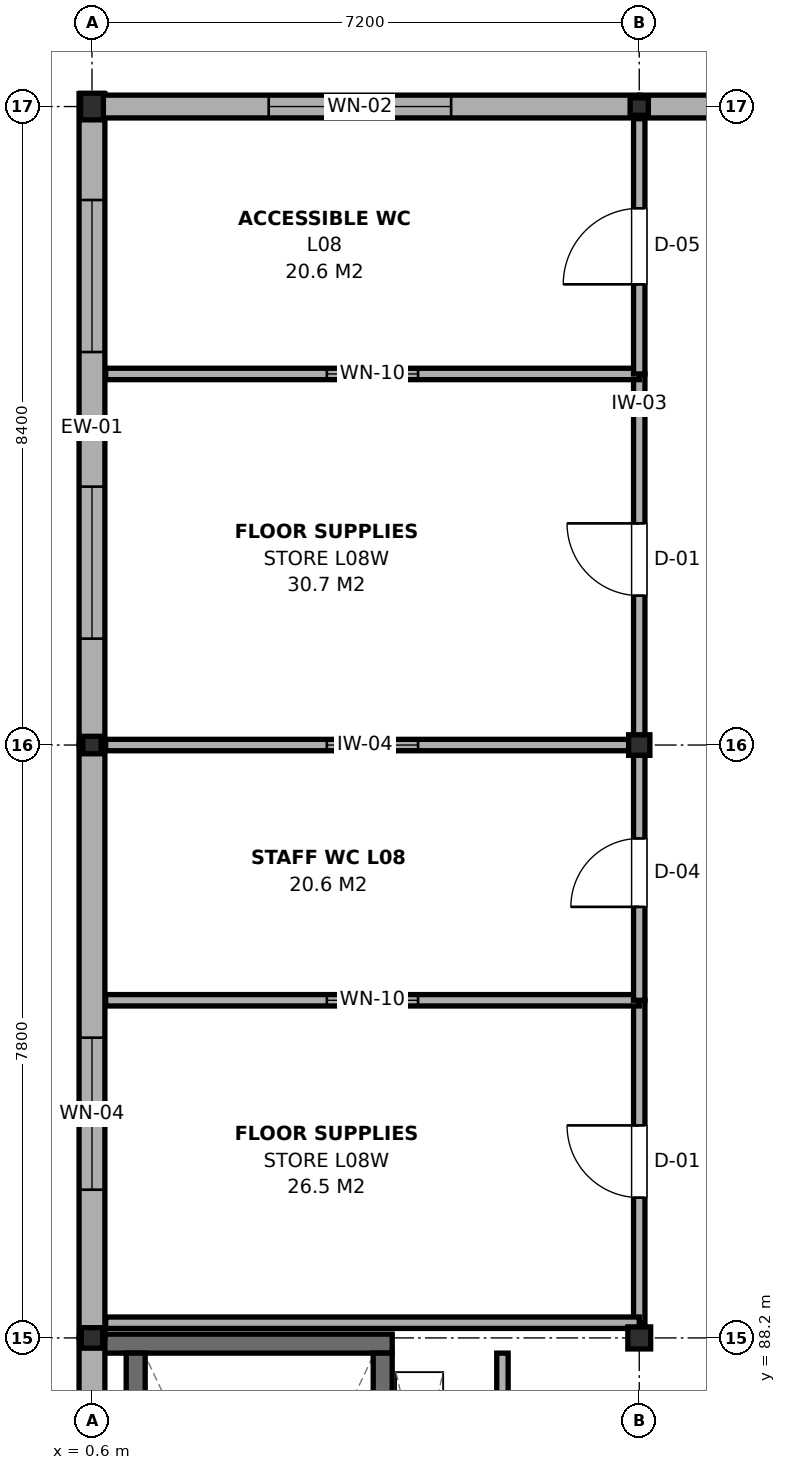
"""IFC4 building model, lengths in metres.
Left out: names, types, materials, properties, quantities, classifications, styles, units other than length and angle.
Written with IfcOpenShell. Run it as: python <this file> out.ifc"""

import sys

from ifc_helpers import new_model, si_unit, direction, frame, frame_2d, origin, origin_2d, place, context, subcontext, project, spatial, rectangle, i_section, extrude, element, fill, save


model = new_model("IFC4")
c1 = context("Model", 3, precision=1e-05, world=origin(), true_north=direction((0.0, 1.0)))
c2 = subcontext(c1, "Body", "Model", "MODEL_VIEW")
j1 = project(units=[si_unit("LENGTHUNIT", "METRE"), si_unit("PLANEANGLEUNIT", "RADIAN")], contexts=[c1])
p1 = place(None, origin())
s1 = spatial("IfcSite", under=j1, at=p1, CompositionType="ELEMENT")
p2 = place(p1, origin())
s2 = spatial("IfcBuilding", under=s1, at=p2, CompositionType="ELEMENT")
p3 = place(p2, frame((0.0, 0.0, 32.7)))
s3 = spatial("IfcBuildingStorey", under=s2, at=p3, CompositionType="ELEMENT", Elevation=32.7)
p4 = place(p3, frame((0.6, 88.2, 0.0), z_axis=(0.0, 0.0, 1.0), x_axis=(1.0, 0.0, 0.0)))
e1 = element("IfcColumn", 1, at=p4, inside=s3, PredefinedType="COLUMN", context=c2, shape_type="SweptSolid", body=[
    extrude(i_section(OverallWidth=0.28, OverallDepth=0.27, WebThickness=0.008, FlangeThickness=0.013, FilletRadius=0.024, at=origin_2d()), origin(), (0.0, 0.0, 1.0), 3.72),
])
p5 = place(p3, frame((0.6, 96.0, 0.0), z_axis=(0.0, 0.0, 1.0), x_axis=(1.0, 0.0, 0.0)))
e2 = element("IfcColumn", 2, at=p5, inside=s3, PredefinedType="COLUMN", context=c2, shape_type="SweptSolid", body=[
    extrude(i_section(OverallWidth=0.24, OverallDepth=0.23, WebThickness=0.008, FlangeThickness=0.012, FilletRadius=0.021, at=origin_2d()), origin(), (0.0, 0.0, 1.0), 3.72),
])
p6 = place(p3, frame((0.6, 104.4, 0.0), z_axis=(0.0, 0.0, 1.0), x_axis=(1.0, 0.0, 0.0)))
e3 = element("IfcColumn", 3, at=p6, inside=s3, PredefinedType="COLUMN", context=c2, shape_type="SweptSolid", body=[
    extrude(i_section(OverallWidth=0.3, OverallDepth=0.35, WebThickness=0.01, FlangeThickness=0.018, FilletRadius=0.027, at=origin_2d()), origin(), (0.0, 0.0, 1.0), 3.72),
])
p7 = place(p3, frame((7.8, 88.2, 0.0), z_axis=(0.0, 0.0, 1.0), x_axis=(1.0, 0.0, 0.0)))
e4 = element("IfcColumn", 4, at=p7, inside=s3, PredefinedType="COLUMN", context=c2, shape_type="SweptSolid", body=[
    extrude(i_section(OverallWidth=0.3, OverallDepth=0.29, WebThickness=0.009, FlangeThickness=0.014, FilletRadius=0.027, at=origin_2d()), origin(), (0.0, 0.0, 1.0), 3.72),
])
p8 = place(p3, frame((7.8, 96.0, 0.0), z_axis=(0.0, 0.0, 1.0), x_axis=(1.0, 0.0, 0.0)))
e5 = element("IfcColumn", 5, at=p8, inside=s3, PredefinedType="COLUMN", context=c2, shape_type="SweptSolid", body=[
    extrude(i_section(OverallWidth=0.28, OverallDepth=0.27, WebThickness=0.008, FlangeThickness=0.013, FilletRadius=0.024, at=origin_2d()), origin(), (0.0, 0.0, 1.0), 3.72),
])
p9 = place(p3, frame((7.8, 104.4, 0.0), z_axis=(0.0, 0.0, 1.0), x_axis=(1.0, 0.0, 0.0)))
e6 = element("IfcColumn", 6, at=p9, inside=s3, PredefinedType="COLUMN", context=c2, shape_type="SweptSolid", body=[
    extrude(i_section(OverallWidth=0.24, OverallDepth=0.23, WebThickness=0.008, FlangeThickness=0.012, FilletRadius=0.021, at=origin_2d()), origin(), (0.0, 0.0, 1.0), 3.72),
])
p10 = place(p3, frame((0.75, 88.125, 0.0), z_axis=(0.0, 0.0, 1.0), x_axis=(1.0, 0.0, 0.0)))
e7 = element("IfcWall", 7, at=p10, inside=s3, PredefinedType="SHEAR", context=c2, shape_type="SweptSolid", body=[
    extrude(rectangle(XDim=3.8, YDim=0.25, at=frame_2d((1.9, 0.0))), origin(), (0.0, 0.0, 1.0), 3.9),
])
p11 = place(p3, frame((1.175, 81.6, 0.0), z_axis=(0.0, 0.0, 1.0), x_axis=(0.0, 1.0, 0.0)))
e8 = element("IfcWall", 8, at=p11, inside=s3, PredefinedType="SHEAR", context=c2, shape_type="SweptSolid", body=[
    extrude(rectangle(XDim=6.4, YDim=0.25, at=frame_2d((3.2, 0.0))), origin(), (0.0, 0.0, 1.0), 3.9),
])
p12 = place(p3, frame((4.425, 81.6, 0.0), z_axis=(0.0, 0.0, 1.0), x_axis=(0.0, 1.0, 0.0)))
e9 = element("IfcWall", 9, at=p12, inside=s3, PredefinedType="SHEAR", context=c2, shape_type="SweptSolid", body=[
    extrude(rectangle(XDim=6.4, YDim=0.25, at=frame_2d((3.2, 0.0))), origin(), (0.0, 0.0, 1.0), 3.9),
])
p13 = place(p12, frame((0.17, 0.0, 0.0)))
e10 = element("IfcOpeningElement", 10, at=p13, cuts=e9, PredefinedType="OPENING", context=c2, shape_type="SweptSolid", body=[
    extrude(rectangle(XDim=1.1, YDim=2.15, at=frame_2d((0.55, 1.075))), frame((0.0, 0.14, 0.0), z_axis=(0.0, -1.0, 0.0), x_axis=(1.0, 0.0, 0.0)), (0.0, 0.0, 1.0), 0.28),
])
p14 = place(p3, frame((0.6, 81.0, 0.0), z_axis=(0.0, 0.0, 1.0), x_axis=(0.0, 1.0, 0.0)))
e11 = element("IfcWall", 11, at=p14, inside=s3, PredefinedType="SOLIDWALL", context=c2, shape_type="SweptSolid", body=[
    extrude(rectangle(XDim=7.2, YDim=0.34, at=frame_2d((3.6, 0.0))), origin(), (0.0, 0.0, 1.0), 3.165),
])
p15 = place(p3, frame((0.6, 88.2, 0.0), z_axis=(0.0, 0.0, 1.0), x_axis=(0.0, 1.0, 0.0)))
e12 = element("IfcWall", 12, at=p15, inside=s3, PredefinedType="SOLIDWALL", context=c2, shape_type="SweptSolid", body=[
    extrude(rectangle(XDim=7.8, YDim=0.34, at=frame_2d((3.9, 0.0))), origin(), (0.0, 0.0, 1.0), 3.125),
])
p16 = place(p15, frame((1.95, 0.0, 0.9)))
e13 = element("IfcOpeningElement", 13, at=p16, cuts=e12, PredefinedType="OPENING", context=c2, shape_type="SweptSolid", body=[
    extrude(rectangle(XDim=2.0, YDim=1.8, at=frame_2d((1.0, 0.9))), frame((0.0, 0.185, 0.0), z_axis=(0.0, -1.0, 0.0), x_axis=(1.0, 0.0, 0.0)), (0.0, 0.0, 1.0), 0.37),
])
p17 = place(p3, frame((0.6, 96.0, 0.0), z_axis=(0.0, 0.0, 1.0), x_axis=(0.0, 1.0, 0.0)))
e14 = element("IfcWall", 14, at=p17, inside=s3, PredefinedType="SOLIDWALL", context=c2, shape_type="SweptSolid", body=[
    extrude(rectangle(XDim=8.57, YDim=0.34, at=frame_2d((4.285, 0.0))), origin(), (0.0, 0.0, 1.0), 3.125),
])
p18 = place(p17, frame((1.4, 0.0, 0.9)))
e15 = element("IfcOpeningElement", 15, at=p18, cuts=e14, PredefinedType="OPENING", context=c2, shape_type="SweptSolid", body=[
    extrude(rectangle(XDim=2.0, YDim=1.8, at=frame_2d((1.0, 0.9))), frame((0.0, 0.185, 0.0), z_axis=(0.0, -1.0, 0.0), x_axis=(1.0, 0.0, 0.0)), (0.0, 0.0, 1.0), 0.37),
])
p19 = place(p17, frame((5.17, 0.0, 0.9)))
e16 = element("IfcOpeningElement", 16, at=p19, cuts=e14, PredefinedType="OPENING", context=c2, shape_type="SweptSolid", body=[
    extrude(rectangle(XDim=2.0, YDim=1.8, at=frame_2d((1.0, 0.9))), frame((0.0, 0.185, 0.0), z_axis=(0.0, -1.0, 0.0), x_axis=(1.0, 0.0, 0.0)), (0.0, 0.0, 1.0), 0.37),
])
p20 = place(p3, frame((0.45, 104.4, 0.0), z_axis=(0.0, 0.0, 1.0), x_axis=(1.0, 0.0, 0.0)))
e17 = element("IfcWall", 17, at=p20, inside=s3, PredefinedType="SOLIDWALL", context=c2, shape_type="SweptSolid", body=[
    extrude(rectangle(XDim=7.35, YDim=0.3, at=frame_2d((3.675, 0.0))), origin(), (0.0, 0.0, 1.0), 3.215),
])
p21 = place(p20, frame((2.475, 0.0, 0.9)))
e18 = element("IfcOpeningElement", 18, at=p21, cuts=e17, PredefinedType="OPENING", context=c2, shape_type="SweptSolid", body=[
    extrude(rectangle(XDim=2.4, YDim=2.1, at=frame_2d((1.2, 1.05))), frame((0.0, 0.165, 0.0), z_axis=(0.0, -1.0, 0.0), x_axis=(1.0, 0.0, 0.0)), (0.0, 0.0, 1.0), 0.33),
])
p22 = place(p3, frame((7.8, 104.4, 0.0), z_axis=(0.0, 0.0, 1.0), x_axis=(1.0, 0.0, 0.0)))
e19 = element("IfcWall", 19, at=p22, inside=s3, PredefinedType="SOLIDWALL", context=c2, shape_type="SweptSolid", body=[
    extrude(rectangle(XDim=7.35, YDim=0.3, at=frame_2d((3.675, 0.0))), origin(), (0.0, 0.0, 1.0), 3.215),
])
p23 = place(p22, frame((3.425, 0.0, 0.9)))
e20 = element("IfcOpeningElement", 20, at=p23, cuts=e19, PredefinedType="OPENING", context=c2, shape_type="SweptSolid", body=[
    extrude(rectangle(XDim=2.4, YDim=2.1, at=frame_2d((1.2, 1.05))), frame((0.0, 0.165, 0.0), z_axis=(0.0, -1.0, 0.0), x_axis=(1.0, 0.0, 0.0)), (0.0, 0.0, 1.0), 0.33),
])
p24 = place(p3, frame((6.0, 84.8, 0.0), z_axis=(0.0, 0.0, 1.0), x_axis=(0.0, 1.0, 0.0)))
e21 = element("IfcWall", 21, at=p24, inside=s3, PredefinedType="PARTITIONING", context=c2, shape_type="SweptSolid", body=[
    extrude(rectangle(XDim=3.2, YDim=0.15, at=frame_2d((1.6, 0.0))), origin(), (0.0, 0.0, 1.0), 3.365),
])
p25 = place(p24, frame((1.175, 0.0, 0.0)))
e22 = element("IfcOpeningElement", 22, at=p25, cuts=e21, PredefinedType="OPENING", context=c2, shape_type="SweptSolid", body=[
    extrude(rectangle(XDim=0.85, YDim=2.1, at=frame_2d((0.425, 1.05))), frame((0.0, 0.09, 0.0), z_axis=(0.0, -1.0, 0.0), x_axis=(1.0, 0.0, 0.0)), (0.0, 0.0, 1.0), 0.18),
])
p26 = place(p3, frame((7.8, 88.4, 0.0), z_axis=(0.0, 0.0, 1.0), x_axis=(0.0, 1.0, 0.0)))
e23 = element("IfcWall", 23, at=p26, inside=s3, PredefinedType="PARTITIONING", context=c2, shape_type="SweptSolid", body=[
    extrude(rectangle(XDim=4.242, YDim=0.15, at=frame_2d((2.121, 0.0))), origin(), (0.0, 0.0, 1.0), 3.365),
])
p27 = place(p26, frame((1.646, 0.0, 0.0)))
e24 = element("IfcOpeningElement", 24, at=p27, cuts=e23, PredefinedType="OPENING", context=c2, shape_type="SweptSolid", body=[
    extrude(rectangle(XDim=0.95, YDim=2.15, at=frame_2d((0.475, 1.075))), frame((0.0, 0.09, 0.0), z_axis=(0.0, -1.0, 0.0), x_axis=(1.0, 0.0, 0.0)), (0.0, 0.0, 1.0), 0.18),
])
p28 = place(p3, frame((0.78, 92.642, 0.0), z_axis=(0.0, 0.0, 1.0), x_axis=(1.0, 0.0, 0.0)))
e25 = element("IfcWall", 25, at=p28, inside=s3, PredefinedType="PARTITIONING", context=c2, shape_type="SweptSolid", body=[
    extrude(rectangle(XDim=7.02, YDim=0.15, at=frame_2d((3.51, 0.0))), origin(), (0.0, 0.0, 1.0), 3.265),
])
p29 = place(p28, frame((2.91, 0.0, 0.95)))
e26 = element("IfcOpeningElement", 26, at=p29, cuts=e25, PredefinedType="OPENING", context=c2, shape_type="SweptSolid", body=[
    extrude(rectangle(XDim=1.2, YDim=1.5, at=frame_2d((0.6, 0.75))), frame((0.0, 0.09, 0.0), z_axis=(0.0, -1.0, 0.0), x_axis=(1.0, 0.0, 0.0)), (0.0, 0.0, 1.0), 0.18),
])
p30 = place(p3, frame((7.8, 92.642, 0.0), z_axis=(0.0, 0.0, 1.0), x_axis=(0.0, 1.0, 0.0)))
e27 = element("IfcWall", 27, at=p30, inside=s3, PredefinedType="PARTITIONING", context=c2, shape_type="SweptSolid", body=[
    extrude(rectangle(XDim=3.358, YDim=0.15, at=frame_2d((1.679, 0.0))), origin(), (0.0, 0.0, 1.0), 3.115),
])
p31 = place(p30, frame((1.229, 0.0, 0.0)))
e28 = element("IfcOpeningElement", 28, at=p31, cuts=e27, PredefinedType="OPENING", context=c2, shape_type="SweptSolid", body=[
    extrude(rectangle(XDim=0.9, YDim=2.15, at=frame_2d((0.45, 1.075))), frame((0.0, 0.09, 0.0), z_axis=(0.0, -1.0, 0.0), x_axis=(1.0, 0.0, 0.0)), (0.0, 0.0, 1.0), 0.18),
])
p32 = place(p3, frame((0.78, 88.4, 0.0), z_axis=(0.0, 0.0, 1.0), x_axis=(1.0, 0.0, 0.0)))
e29 = element("IfcWall", 29, at=p32, inside=s3, PredefinedType="PARTITIONING", context=c2, shape_type="SweptSolid", body=[
    extrude(rectangle(XDim=7.02, YDim=0.15, at=frame_2d((3.51, 0.0))), origin(), (0.0, 0.0, 1.0), 3.265),
])
p33 = place(p3, frame((7.8, 96.0, 0.0), z_axis=(0.0, 0.0, 1.0), x_axis=(0.0, 1.0, 0.0)))
e30 = element("IfcWall", 30, at=p33, inside=s3, PredefinedType="PARTITIONING", context=c2, shape_type="SweptSolid", body=[
    extrude(rectangle(XDim=4.882, YDim=0.15, at=frame_2d((2.441, 0.0))), origin(), (0.0, 0.0, 1.0), 3.115),
])
p34 = place(p33, frame((1.966, 0.0, 0.0)))
e31 = element("IfcOpeningElement", 31, at=p34, cuts=e30, PredefinedType="OPENING", context=c2, shape_type="SweptSolid", body=[
    extrude(rectangle(XDim=0.95, YDim=2.15, at=frame_2d((0.475, 1.075))), frame((0.0, 0.09, 0.0), z_axis=(0.0, -1.0, 0.0), x_axis=(1.0, 0.0, 0.0)), (0.0, 0.0, 1.0), 0.18),
])
p35 = place(p3, frame((0.78, 100.882, 0.0), z_axis=(0.0, 0.0, 1.0), x_axis=(1.0, 0.0, 0.0)))
e32 = element("IfcWall", 32, at=p35, inside=s3, PredefinedType="PARTITIONING", context=c2, shape_type="SweptSolid", body=[
    extrude(rectangle(XDim=7.02, YDim=0.15, at=frame_2d((3.51, 0.0))), origin(), (0.0, 0.0, 1.0), 3.125),
])
p36 = place(p35, frame((2.91, 0.0, 0.95)))
e33 = element("IfcOpeningElement", 33, at=p36, cuts=e32, PredefinedType="OPENING", context=c2, shape_type="SweptSolid", body=[
    extrude(rectangle(XDim=1.2, YDim=1.5, at=frame_2d((0.6, 0.75))), frame((0.0, 0.09, 0.0), z_axis=(0.0, -1.0, 0.0), x_axis=(1.0, 0.0, 0.0)), (0.0, 0.0, 1.0), 0.18),
])
p37 = place(p3, frame((7.8, 100.882, 0.0), z_axis=(0.0, 0.0, 1.0), x_axis=(0.0, 1.0, 0.0)))
e34 = element("IfcWall", 34, at=p37, inside=s3, PredefinedType="PARTITIONING", context=c2, shape_type="SweptSolid", body=[
    extrude(rectangle(XDim=3.358, YDim=0.15, at=frame_2d((1.679, 0.0))), origin(), (0.0, 0.0, 1.0), 3.175),
])
p38 = place(p37, frame((1.179, 0.0, 0.0)))
e35 = element("IfcOpeningElement", 35, at=p38, cuts=e34, PredefinedType="OPENING", context=c2, shape_type="SweptSolid", body=[
    extrude(rectangle(XDim=1.0, YDim=2.15, at=frame_2d((0.5, 1.075))), frame((0.0, 0.09, 0.0), z_axis=(0.0, -1.0, 0.0), x_axis=(1.0, 0.0, 0.0)), (0.0, 0.0, 1.0), 0.18),
])
p39 = place(p3, frame((0.78, 96.0, 0.0), z_axis=(0.0, 0.0, 1.0), x_axis=(1.0, 0.0, 0.0)))
e36 = element("IfcWall", 36, at=p39, inside=s3, PredefinedType="PARTITIONING", context=c2, shape_type="SweptSolid", body=[
    extrude(rectangle(XDim=7.02, YDim=0.15, at=frame_2d((3.51, 0.0))), origin(), (0.0, 0.0, 1.0), 3.115),
])
p40 = place(p39, frame((2.91, 0.0, 0.95)))
e37 = element("IfcOpeningElement", 37, at=p40, cuts=e36, PredefinedType="OPENING", context=c2, shape_type="SweptSolid", body=[
    extrude(rectangle(XDim=1.2, YDim=1.5, at=frame_2d((0.6, 0.75))), frame((0.0, 0.09, 0.0), z_axis=(0.0, -1.0, 0.0), x_axis=(1.0, 0.0, 0.0)), (0.0, 0.0, 1.0), 0.18),
])
p41 = place(p16, origin())
e38 = element("IfcWindow", 38, at=p41, inside=s3, PartitioningType="SINGLE_PANEL", PredefinedType="WINDOW", context=c2, shape_type="SweptSolid", body=[
    extrude(rectangle(XDim=2.0, YDim=1.8, at=frame_2d((1.0, 0.9))), frame((0.0, 0.03, 0.0), z_axis=(0.0, -1.0, 0.0), x_axis=(1.0, 0.0, 0.0)), (0.0, 0.0, 1.0), 0.06),
])
fill(e13, e38)
p42 = place(p18, origin())
e39 = element("IfcWindow", 39, at=p42, inside=s3, PartitioningType="SINGLE_PANEL", PredefinedType="WINDOW", context=c2, shape_type="SweptSolid", body=[
    extrude(rectangle(XDim=2.0, YDim=1.8, at=frame_2d((1.0, 0.9))), frame((0.0, 0.03, 0.0), z_axis=(0.0, -1.0, 0.0), x_axis=(1.0, 0.0, 0.0)), (0.0, 0.0, 1.0), 0.06),
])
fill(e15, e39)
p43 = place(p19, origin())
e40 = element("IfcWindow", 40, at=p43, inside=s3, PartitioningType="SINGLE_PANEL", PredefinedType="WINDOW", context=c2, shape_type="SweptSolid", body=[
    extrude(rectangle(XDim=2.0, YDim=1.8, at=frame_2d((1.0, 0.9))), frame((0.0, 0.03, 0.0), z_axis=(0.0, -1.0, 0.0), x_axis=(1.0, 0.0, 0.0)), (0.0, 0.0, 1.0), 0.06),
])
fill(e16, e40)
p44 = place(p21, origin())
e41 = element("IfcWindow", 41, at=p44, inside=s3, PartitioningType="SINGLE_PANEL", PredefinedType="WINDOW", context=c2, shape_type="SweptSolid", body=[
    extrude(rectangle(XDim=2.4, YDim=2.1, at=frame_2d((1.2, 1.05))), frame((0.0, 0.03, 0.0), z_axis=(0.0, -1.0, 0.0), x_axis=(1.0, 0.0, 0.0)), (0.0, 0.0, 1.0), 0.06),
])
fill(e18, e41)
p45 = place(p27, origin())
e42 = element("IfcDoor", 42, at=p45, inside=s3, OperationType="SINGLE_SWING_RIGHT", PredefinedType="DOOR", context=c2, shape_type="SweptSolid", body=[
    extrude(rectangle(XDim=0.95, YDim=2.15, at=frame_2d((0.475, 1.075))), frame((0.0, 0.025, 0.0), z_axis=(0.0, -1.0, 0.0), x_axis=(1.0, 0.0, 0.0)), (0.0, 0.0, 1.0), 0.05),
])
fill(e24, e42)
p46 = place(p29, origin())
e43 = element("IfcWindow", 43, at=p46, inside=s3, PartitioningType="SINGLE_PANEL", PredefinedType="WINDOW", context=c2, shape_type="SweptSolid", body=[
    extrude(rectangle(XDim=1.2, YDim=1.5, at=frame_2d((0.6, 0.75))), frame((0.0, 0.03, 0.0), z_axis=(0.0, -1.0, 0.0), x_axis=(1.0, 0.0, 0.0)), (0.0, 0.0, 1.0), 0.06),
])
fill(e26, e43)
p47 = place(p31, origin())
e44 = element("IfcDoor", 44, at=p47, inside=s3, OperationType="SINGLE_SWING_LEFT", PredefinedType="DOOR", context=c2, shape_type="SweptSolid", body=[
    extrude(rectangle(XDim=0.9, YDim=2.15, at=frame_2d((0.45, 1.075))), frame((0.0, 0.025, 0.0), z_axis=(0.0, -1.0, 0.0), x_axis=(1.0, 0.0, 0.0)), (0.0, 0.0, 1.0), 0.05),
])
fill(e28, e44)
p48 = place(p34, origin())
e45 = element("IfcDoor", 45, at=p48, inside=s3, OperationType="SINGLE_SWING_RIGHT", PredefinedType="DOOR", context=c2, shape_type="SweptSolid", body=[
    extrude(rectangle(XDim=0.95, YDim=2.15, at=frame_2d((0.475, 1.075))), frame((0.0, 0.025, 0.0), z_axis=(0.0, -1.0, 0.0), x_axis=(1.0, 0.0, 0.0)), (0.0, 0.0, 1.0), 0.05),
])
fill(e31, e45)
p49 = place(p36, origin())
e46 = element("IfcWindow", 46, at=p49, inside=s3, PartitioningType="SINGLE_PANEL", PredefinedType="WINDOW", context=c2, shape_type="SweptSolid", body=[
    extrude(rectangle(XDim=1.2, YDim=1.5, at=frame_2d((0.6, 0.75))), frame((0.0, 0.03, 0.0), z_axis=(0.0, -1.0, 0.0), x_axis=(1.0, 0.0, 0.0)), (0.0, 0.0, 1.0), 0.06),
])
fill(e33, e46)
p50 = place(p38, origin())
e47 = element("IfcDoor", 47, at=p50, inside=s3, OperationType="SINGLE_SWING_LEFT", PredefinedType="DOOR", context=c2, shape_type="SweptSolid", body=[
    extrude(rectangle(XDim=1.0, YDim=2.15, at=frame_2d((0.5, 1.075))), frame((0.0, 0.025, 0.0), z_axis=(0.0, -1.0, 0.0), x_axis=(1.0, 0.0, 0.0)), (0.0, 0.0, 1.0), 0.05),
])
fill(e35, e47)
p51 = place(p40, origin())
e48 = element("IfcWindow", 48, at=p51, inside=s3, PartitioningType="SINGLE_PANEL", PredefinedType="WINDOW", context=c2, shape_type="SweptSolid", body=[
    extrude(rectangle(XDim=1.2, YDim=1.5, at=frame_2d((0.6, 0.75))), frame((0.0, 0.03, 0.0), z_axis=(0.0, -1.0, 0.0), x_axis=(1.0, 0.0, 0.0)), (0.0, 0.0, 1.0), 0.06),
])
fill(e37, e48)
save(model, sys.argv[1])
